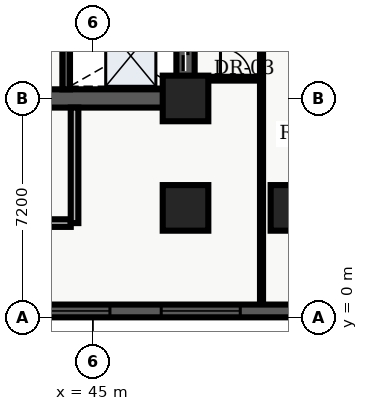
"""IFC4 building model, lengths in metres.
Left out: names, types, materials, properties, quantities, classifications, styles, units other than length and angle.
Written with IfcOpenShell. Run it as: python <this file> out.ifc"""

import sys

from ifc_helpers import new_model, entity, si_unit, converted_unit, direction, frame, origin_with_axes, origin_2d_with_axis, place, context, subcontext, project, spatial, polyline, rectangle, outline, extrude, element, fill, save


model = new_model("IFC4")
c1 = context("Model", 3, precision=1e-05, world=origin_with_axes(), true_north=direction((0.0, 1.0)))
c2 = subcontext(c1, "Body", "Model", "MODEL_VIEW")
j1 = project(units=[si_unit("LENGTHUNIT", "METRE"), converted_unit("PLANEANGLEUNIT", "DEGREE", entity("IfcPlaneAngleMeasure", 0.017), si_unit("PLANEANGLEUNIT", "RADIAN"), dimensions=[0, 0, 0, 0, 0, 0, 0])], contexts=[c1])
p1 = place(None, origin_with_axes())
s1 = spatial("IfcSite", under=j1, at=p1, CompositionType="ELEMENT")
p2 = place(p1, origin_with_axes())
s2 = spatial("IfcBuilding", under=s1, at=p2, CompositionType="ELEMENT")
p3 = place(p2, frame((0.0, 0.0, 15.3), z_axis=(0.0, 0.0, 1.0), x_axis=(1.0, 0.0, 0.0)))
s3 = spatial("IfcBuildingStorey", under=s2, at=p3, CompositionType="ELEMENT", Elevation=15.3)
p4 = place(p3, frame((40.2, 7.2, 0.0), z_axis=(0.0, 0.0, 1.0), x_axis=(1.0, 0.0, 0.0)))
e1 = element("IfcWall", 1, at=p4, inside=s3, PredefinedType="SHEAR", context=c2, shape_type="SweptSolid", body=[
    extrude(outline(polyline([(0.0, -0.3), (7.85, -0.3), (7.85, 0.3), (0.0, 0.3), (0.0, -0.3)])), origin_with_axes(), (0.0, 0.0, 1.0), 4.26),
])
p5 = place(p4, frame((2.175, 0.0, 0.0), z_axis=(0.0, 0.0, 1.0), x_axis=(1.0, 0.0, 0.0)))
e2 = element("IfcOpeningElement", 2, at=p5, cuts=e1, PredefinedType="OPENING", context=c2, shape_type="SweptSolid", body=[
    extrude(rectangle(XDim=1.05, YDim=0.62, at=origin_2d_with_axis()), origin_with_axes(), (0.0, 0.0, 1.0), 2.15),
])
p6 = place(p3, frame((48.05, 7.2, 0.0), z_axis=(0.0, 0.0, 1.0), x_axis=(0.0, 1.0, 0.0)))
e3 = element("IfcWall", 3, at=p6, inside=s3, PredefinedType="SHEAR", context=c2, shape_type="SweptSolid", body=[
    extrude(outline(polyline([(0.0, -0.3), (15.6, -0.3), (15.6, 0.3), (0.0, 0.3), (0.0, -0.3)])), origin_with_axes(), (0.0, 0.0, 1.0), 4.26),
])
p7 = place(p6, frame((1.425, 0.0, 0.0), z_axis=(0.0, 0.0, 1.0), x_axis=(1.0, 0.0, 0.0)))
e4 = element("IfcOpeningElement", 4, at=p7, cuts=e3, PredefinedType="OPENING", context=c2, shape_type="SweptSolid", body=[
    extrude(rectangle(XDim=1.05, YDim=0.62, at=origin_2d_with_axis()), origin_with_axes(), (0.0, 0.0, 1.0), 2.15),
])
p8 = place(p6, frame((3.475, 0.0, 0.0), z_axis=(0.0, 0.0, 1.0), x_axis=(1.0, 0.0, 0.0)))
e5 = element("IfcOpeningElement", 5, at=p8, cuts=e3, PredefinedType="OPENING", context=c2, shape_type="SweptSolid", body=[
    extrude(rectangle(XDim=1.05, YDim=0.62, at=origin_2d_with_axis()), origin_with_axes(), (0.0, 0.0, 1.0), 2.15),
])
p9 = place(p6, frame((5.625, 0.0, 0.0), z_axis=(0.0, 0.0, 1.0), x_axis=(1.0, 0.0, 0.0)))
e6 = element("IfcOpeningElement", 6, at=p9, cuts=e3, PredefinedType="OPENING", context=c2, shape_type="SweptSolid", body=[
    extrude(rectangle(XDim=0.95, YDim=0.62, at=origin_2d_with_axis()), origin_with_axes(), (0.0, 0.0, 1.0), 2.15),
])
p10 = place(p3, frame((44.125, 7.5, 0.0), z_axis=(0.0, 0.0, 1.0), x_axis=(0.0, 1.0, 0.0)))
e7 = element("IfcWall", 7, at=p10, inside=s3, PredefinedType="SHEAR", context=c2, shape_type="SweptSolid", body=[
    extrude(outline(polyline([(0.0, -0.125), (15.0, -0.125), (15.0, 0.125), (0.0, 0.125), (0.0, -0.125)])), origin_with_axes(), (0.0, 0.0, 1.0), 4.26),
])
p11 = place(p3, frame((40.325, 3.1, 0.0), z_axis=(0.0, 0.0, 1.0), x_axis=(1.0, 0.0, 0.0)))
e8 = element("IfcWall", 8, at=p11, inside=s3, PredefinedType="SOLIDWALL", context=c2, shape_type="SweptSolid", body=[
    extrude(outline(polyline([(0.0, -0.125), (3.95, -0.125), (3.95, 0.125), (0.0, 0.125), (0.0, -0.125)])), origin_with_axes(), (0.0, 0.0, 1.0), 3.3),
])
p12 = place(p3, frame((44.4, 3.1, 0.0), z_axis=(0.0, 0.0, 1.0), x_axis=(0.0, 1.0, 0.0)))
e9 = element("IfcWall", 9, at=p12, inside=s3, PredefinedType="SOLIDWALL", context=c2, shape_type="SweptSolid", body=[
    extrude(outline(polyline([(0.0, -0.125), (3.8, -0.125), (3.8, 0.125), (0.0, 0.125), (0.0, -0.125)])), origin_with_axes(), (0.0, 0.0, 1.0), 3.3),
])
for number, where, z_axis, x_axis in (
    (10, (48.05, 3.6, 0.0), (0.0, 0.0, 1.0), (1.0, 0.0, 0.0)),
    (11, (48.05, 7.2, 0.0), (0.0, 0.0, 1.0), (1.0, 0.0, 0.0)),
    (12, (51.6, 3.6, 0.0), (0.0, 0.0, 1.0), (1.0, 0.0, 0.0)),
):
    element("IfcColumn", number, at=place(p3, frame(where, z_axis=z_axis, x_axis=x_axis)), inside=s3, PredefinedType="COLUMN", context=c2, shape_type="SweptSolid", body=[
        extrude(rectangle(XDim=1.5, YDim=1.5, at=origin_2d_with_axis()), origin_with_axes(), (0.0, 0.0, 1.0), 4.5),
    ])
p13 = place(p3, frame((50.55, 0.38, 0.0), z_axis=(0.0, 0.0, 1.0), x_axis=(0.0, 1.0, 0.0)))
e13 = element("IfcWall", 13, at=p13, inside=s3, PredefinedType="PARTITIONING", context=c2, shape_type="SweptSolid", body=[
    extrude(outline(polyline([(0.0, -0.05), (38.84, -0.05), (38.84, 0.05), (0.0, 0.05), (0.0, -0.05)])), origin_with_axes(), (0.0, 0.0, 1.0), 3.2),
])
p14 = place(p13, frame((12.8, 0.0, 0.0), z_axis=(0.0, 0.0, 1.0), x_axis=(1.0, 0.0, 0.0)))
e14 = element("IfcOpeningElement", 14, at=p14, cuts=e13, PredefinedType="OPENING", context=c2, shape_type="SweptSolid", body=[
    extrude(rectangle(XDim=1.6, YDim=0.12, at=origin_2d_with_axis()), origin_with_axes(), (0.0, 0.0, 1.0), 2.2),
])
p15 = place(p13, frame((27.8, 0.0, 0.0), z_axis=(0.0, 0.0, 1.0), x_axis=(1.0, 0.0, 0.0)))
e15 = element("IfcOpeningElement", 15, at=p15, cuts=e13, PredefinedType="OPENING", context=c2, shape_type="SweptSolid", body=[
    extrude(rectangle(XDim=1.6, YDim=0.12, at=origin_2d_with_axis()), origin_with_axes(), (0.0, 0.0, 1.0), 2.2),
])
p16 = place(p3, frame((48.05, 7.85, 0.0), z_axis=(0.0, 0.0, 1.0), x_axis=(1.0, 0.0, 0.0)))
e16 = element("IfcWall", 16, at=p16, inside=s3, PredefinedType="PARTITIONING", context=c2, shape_type="SweptSolid", body=[
    extrude(outline(polyline([(0.0, -0.062), (2.5, -0.062), (2.5, 0.062), (0.0, 0.062), (0.0, -0.062)])), origin_with_axes(), (0.0, 0.0, 1.0), 3.2),
])
p17 = place(p16, frame((1.65, 0.0, 0.0), z_axis=(0.0, 0.0, 1.0), x_axis=(1.0, 0.0, 0.0)))
e17 = element("IfcOpeningElement", 17, at=p17, cuts=e16, PredefinedType="OPENING", context=c2, shape_type="SweptSolid", body=[
    extrude(rectangle(XDim=1.0, YDim=0.145, at=origin_2d_with_axis()), origin_with_axes(), (0.0, 0.0, 1.0), 2.15),
])
p18 = place(p3, frame((67.98, 0.21, 0.0), z_axis=(0.0, 0.0, 1.0), x_axis=(-1.0, 0.0, 0.0)))
e18 = element("IfcWall", 18, at=p18, inside=s3, PredefinedType="SOLIDWALL", context=c2, shape_type="SweptSolid", body=[
    extrude(outline(polyline([(0.0, -0.21), (67.98, -0.21), (67.98, 0.21), (0.0, 0.21), (0.0, -0.21)])), origin_with_axes(), (0.0, 0.0, 1.0), 4.26),
])
p19 = place(p18, frame((3.168, 0.0, 0.45), z_axis=(0.0, 0.0, 1.0), x_axis=(1.0, 0.0, 0.0)))
e19 = element("IfcOpeningElement", 19, at=p19, cuts=e18, PredefinedType="OPENING", context=c2, shape_type="SweptSolid", body=[
    extrude(rectangle(XDim=2.6, YDim=0.44, at=origin_2d_with_axis()), origin_with_axes(), (0.0, 0.0, 1.0), 2.8),
])
p20 = place(p18, frame((8.305, 0.0, 0.45), z_axis=(0.0, 0.0, 1.0), x_axis=(1.0, 0.0, 0.0)))
e20 = element("IfcOpeningElement", 20, at=p20, cuts=e18, PredefinedType="OPENING", context=c2, shape_type="SweptSolid", body=[
    extrude(rectangle(XDim=2.6, YDim=0.44, at=origin_2d_with_axis()), origin_with_axes(), (0.0, 0.0, 1.0), 2.8),
])
p21 = place(p18, frame((13.442, 0.0, 0.45), z_axis=(0.0, 0.0, 1.0), x_axis=(1.0, 0.0, 0.0)))
e21 = element("IfcOpeningElement", 21, at=p21, cuts=e18, PredefinedType="OPENING", context=c2, shape_type="SweptSolid", body=[
    extrude(rectangle(XDim=2.6, YDim=0.44, at=origin_2d_with_axis()), origin_with_axes(), (0.0, 0.0, 1.0), 2.8),
])
p22 = place(p18, frame((19.429, 0.0, 0.45), z_axis=(0.0, 0.0, 1.0), x_axis=(1.0, 0.0, 0.0)))
e22 = element("IfcOpeningElement", 22, at=p22, cuts=e18, PredefinedType="OPENING", context=c2, shape_type="SweptSolid", body=[
    extrude(rectangle(XDim=2.6, YDim=0.44, at=origin_2d_with_axis()), origin_with_axes(), (0.0, 0.0, 1.0), 2.8),
])
p23 = place(p18, frame((23.716, 0.0, 0.45), z_axis=(0.0, 0.0, 1.0), x_axis=(1.0, 0.0, 0.0)))
e23 = element("IfcOpeningElement", 23, at=p23, cuts=e18, PredefinedType="OPENING", context=c2, shape_type="SweptSolid", body=[
    extrude(rectangle(XDim=2.6, YDim=0.44, at=origin_2d_with_axis()), origin_with_axes(), (0.0, 0.0, 1.0), 2.8),
])
p24 = place(p18, frame((28.853, 0.0, 0.45), z_axis=(0.0, 0.0, 1.0), x_axis=(1.0, 0.0, 0.0)))
e24 = element("IfcOpeningElement", 24, at=p24, cuts=e18, PredefinedType="OPENING", context=c2, shape_type="SweptSolid", body=[
    extrude(rectangle(XDim=2.6, YDim=0.44, at=origin_2d_with_axis()), origin_with_axes(), (0.0, 0.0, 1.0), 2.8),
])
p25 = place(p18, frame((33.99, 0.0, 0.45), z_axis=(0.0, 0.0, 1.0), x_axis=(1.0, 0.0, 0.0)))
e25 = element("IfcOpeningElement", 25, at=p25, cuts=e18, PredefinedType="OPENING", context=c2, shape_type="SweptSolid", body=[
    extrude(rectangle(XDim=2.6, YDim=0.44, at=origin_2d_with_axis()), origin_with_axes(), (0.0, 0.0, 1.0), 2.8),
])
p26 = place(p18, frame((39.127, 0.0, 0.45), z_axis=(0.0, 0.0, 1.0), x_axis=(1.0, 0.0, 0.0)))
e26 = element("IfcOpeningElement", 26, at=p26, cuts=e18, PredefinedType="OPENING", context=c2, shape_type="SweptSolid", body=[
    extrude(rectangle(XDim=2.6, YDim=0.44, at=origin_2d_with_axis()), origin_with_axes(), (0.0, 0.0, 1.0), 2.8),
])
p27 = place(p18, frame((44.264, 0.0, 0.45), z_axis=(0.0, 0.0, 1.0), x_axis=(1.0, 0.0, 0.0)))
e27 = element("IfcOpeningElement", 27, at=p27, cuts=e18, PredefinedType="OPENING", context=c2, shape_type="SweptSolid", body=[
    extrude(rectangle(XDim=2.6, YDim=0.44, at=origin_2d_with_axis()), origin_with_axes(), (0.0, 0.0, 1.0), 2.8),
])
p28 = place(p18, frame((49.401, 0.0, 0.45), z_axis=(0.0, 0.0, 1.0), x_axis=(1.0, 0.0, 0.0)))
e28 = element("IfcOpeningElement", 28, at=p28, cuts=e18, PredefinedType="OPENING", context=c2, shape_type="SweptSolid", body=[
    extrude(rectangle(XDim=2.6, YDim=0.44, at=origin_2d_with_axis()), origin_with_axes(), (0.0, 0.0, 1.0), 2.8),
])
p29 = place(p18, frame((54.538, 0.0, 0.45), z_axis=(0.0, 0.0, 1.0), x_axis=(1.0, 0.0, 0.0)))
e29 = element("IfcOpeningElement", 29, at=p29, cuts=e18, PredefinedType="OPENING", context=c2, shape_type="SweptSolid", body=[
    extrude(rectangle(XDim=2.6, YDim=0.44, at=origin_2d_with_axis()), origin_with_axes(), (0.0, 0.0, 1.0), 2.8),
])
p30 = place(p18, frame((59.675, 0.0, 0.45), z_axis=(0.0, 0.0, 1.0), x_axis=(1.0, 0.0, 0.0)))
e30 = element("IfcOpeningElement", 30, at=p30, cuts=e18, PredefinedType="OPENING", context=c2, shape_type="SweptSolid", body=[
    extrude(rectangle(XDim=2.6, YDim=0.44, at=origin_2d_with_axis()), origin_with_axes(), (0.0, 0.0, 1.0), 2.8),
])
p31 = place(p18, frame((64.812, 0.0, 0.45), z_axis=(0.0, 0.0, 1.0), x_axis=(1.0, 0.0, 0.0)))
e31 = element("IfcOpeningElement", 31, at=p31, cuts=e18, PredefinedType="OPENING", context=c2, shape_type="SweptSolid", body=[
    extrude(rectangle(XDim=2.6, YDim=0.44, at=origin_2d_with_axis()), origin_with_axes(), (0.0, 0.0, 1.0), 2.8),
])
p32 = place(p6, frame((1.425, 0.0, 0.0), z_axis=(0.0, 0.0, 1.0), x_axis=(1.0, 0.0, 0.0)))
e32 = element("IfcDoor", 32, at=p32, inside=s3, OperationType="SLIDING_TO_LEFT", PredefinedType="DOOR", context=c2, shape_type="SweptSolid", body=[
    extrude(rectangle(XDim=1.05, YDim=0.09, at=origin_2d_with_axis()), origin_with_axes(), (0.0, 0.0, 1.0), 2.15),
])
fill(e4, e32)
p33 = place(p16, frame((1.65, 0.0, 0.0), z_axis=(0.0, 0.0, 1.0), x_axis=(1.0, 0.0, 0.0)))
e33 = element("IfcDoor", 33, at=p33, inside=s3, OperationType="SINGLE_SWING_LEFT", PredefinedType="DOOR", context=c2, shape_type="SweptSolid", body=[
    extrude(rectangle(XDim=1.0, YDim=0.075, at=origin_2d_with_axis()), origin_with_axes(), (0.0, 0.0, 1.0), 2.15),
])
fill(e17, e33)
p34 = place(p18, frame((19.429, 0.0, 0.45), z_axis=(0.0, 0.0, 1.0), x_axis=(1.0, 0.0, 0.0)))
e34 = element("IfcWindow", 34, at=p34, inside=s3, PredefinedType="WINDOW", context=c2, shape_type="SweptSolid", body=[
    extrude(rectangle(XDim=2.6, YDim=0.09, at=origin_2d_with_axis()), origin_with_axes(), (0.0, 0.0, 1.0), 2.8),
])
fill(e22, e34)
p35 = place(p18, frame((23.716, 0.0, 0.45), z_axis=(0.0, 0.0, 1.0), x_axis=(1.0, 0.0, 0.0)))
e35 = element("IfcWindow", 35, at=p35, inside=s3, PredefinedType="WINDOW", context=c2, shape_type="SweptSolid", body=[
    extrude(rectangle(XDim=2.6, YDim=0.09, at=origin_2d_with_axis()), origin_with_axes(), (0.0, 0.0, 1.0), 2.8),
])
fill(e23, e35)
save(model, sys.argv[1])
